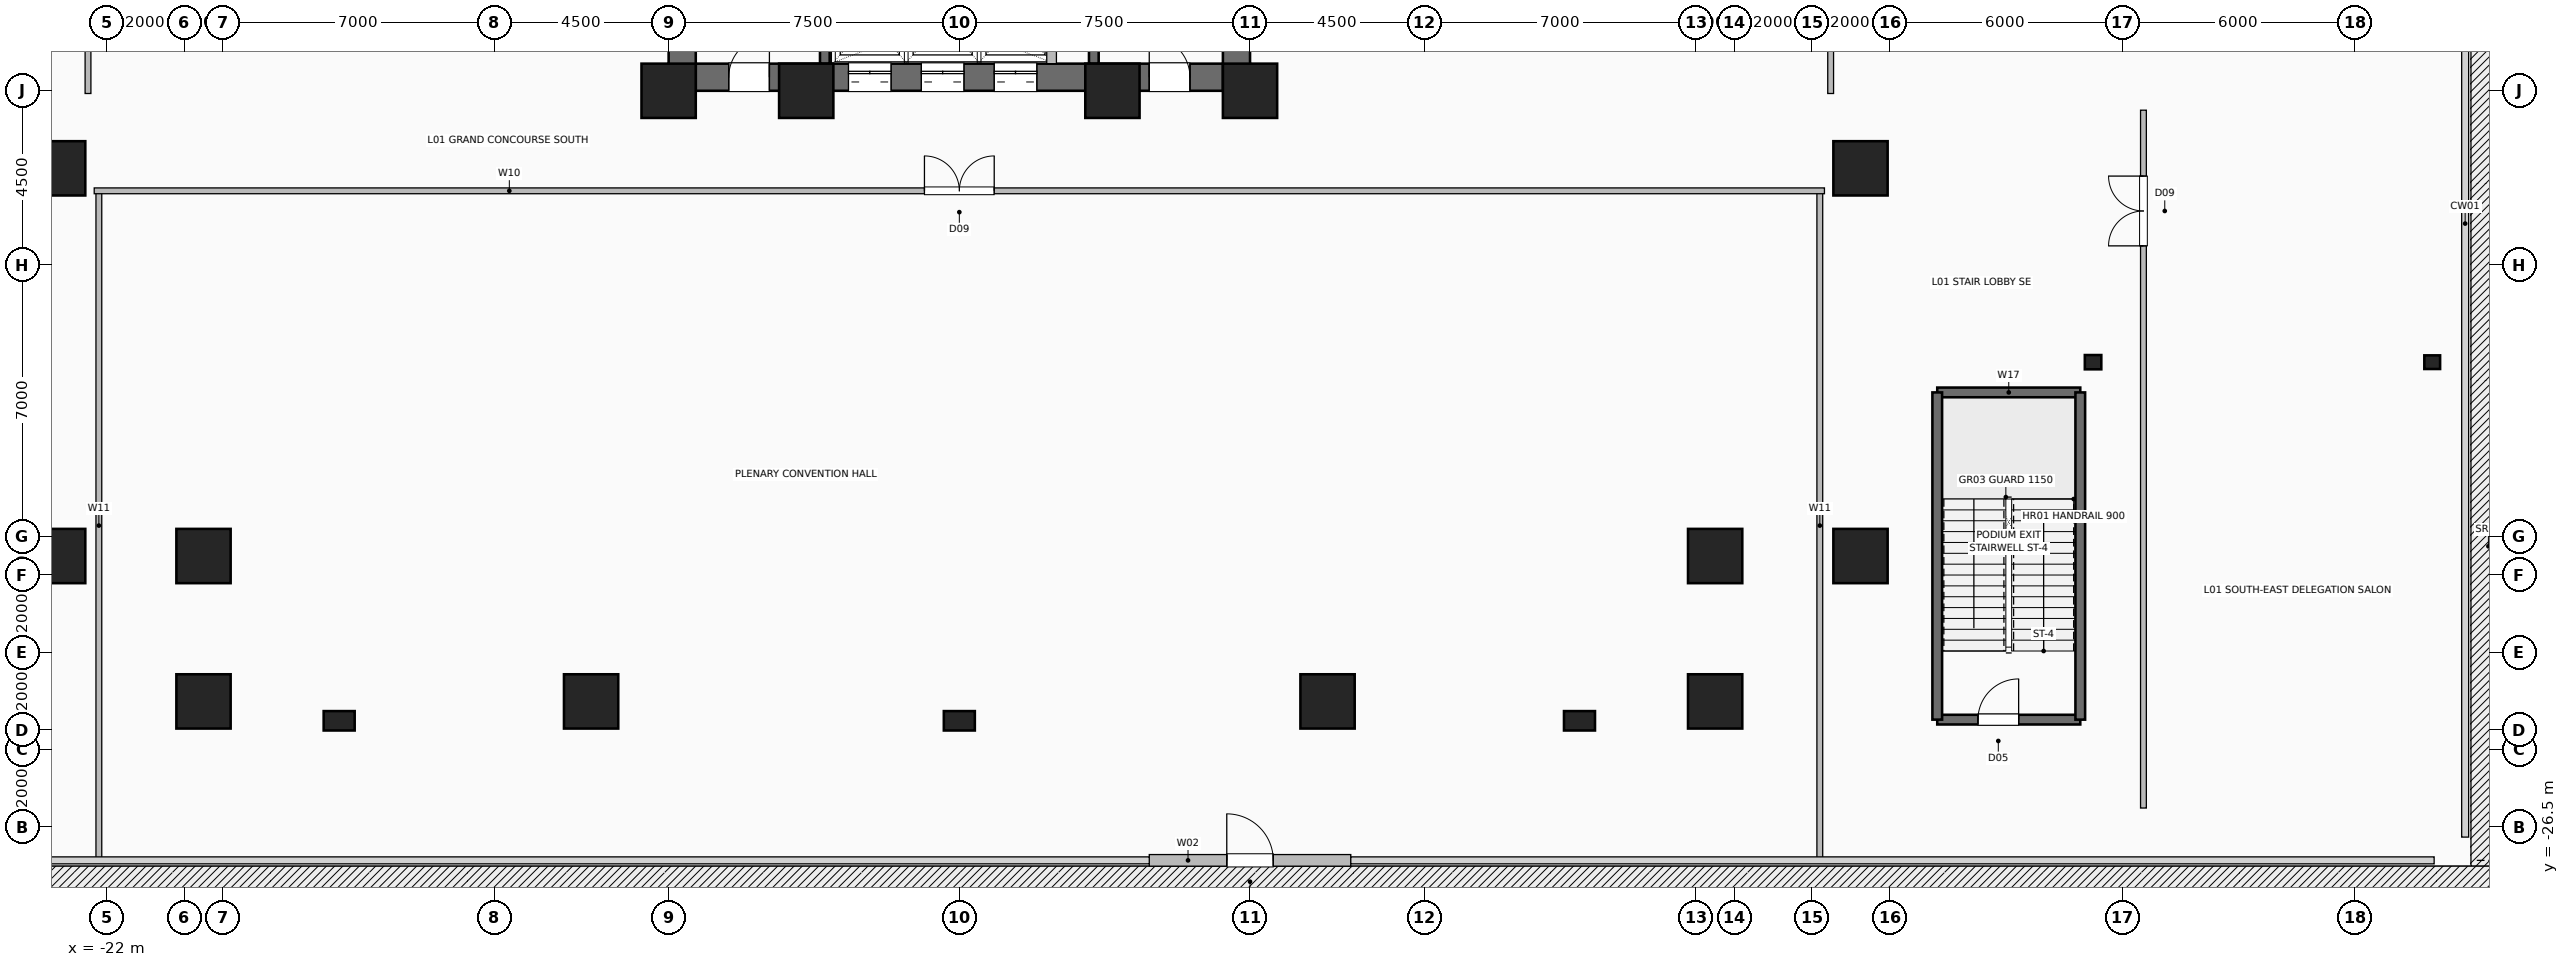
"""IFC4 building model, lengths in metres.
Left out: names, types, materials, properties, quantities, classifications, styles, units other than length and angle.
Written with IfcOpenShell. Run it as: python <this file> out.ifc"""

import sys

from ifc_helpers import new_model, si_unit, direction, frame, frame_2d, origin, origin_2d, place, context, subcontext, project, spatial, rectangle, hollow_rectangle, i_section, extrude, element, fill, save


model = new_model("IFC4")
c1 = context("Model", 3, precision=1e-05, world=origin(), true_north=direction((0.0, 1.0)))
c2 = subcontext(c1, "Body", "Model", "MODEL_VIEW")
j1 = project(units=[si_unit("LENGTHUNIT", "METRE"), si_unit("PLANEANGLEUNIT", "RADIAN")], contexts=[c1])
p1 = place(None, origin())
s1 = spatial("IfcSite", under=j1, at=p1, CompositionType="ELEMENT")
p2 = place(p1, origin())
s2 = spatial("IfcBuilding", under=s1, at=p2, CompositionType="ELEMENT")
p3 = place(p2, frame((0.0, 0.0, 5.4)))
s3 = spatial("IfcBuildingStorey", under=s2, at=p3, CompositionType="ELEMENT", Elevation=5.4)
for number, where, z_axis, x_axis in (
    (1, (-7.5, -7.5, 0.0), (0.0, 0.0, 1.0), (1.0, 0.0, 0.0)),
    (2, (-3.95, -7.5, 0.0), (0.0, 0.0, 1.0), (1.0, 0.0, 0.0)),
    (3, (3.95, -7.5, 0.0), (0.0, 0.0, 1.0), (1.0, 0.0, 0.0)),
    (4, (7.5, -7.5, 0.0), (0.0, 0.0, 1.0), (1.0, 0.0, 0.0)),
    (5, (-19.5, -23.25, 0.0), (0.0, 0.0, 1.0), (1.0, 0.0, 0.0)),
    (6, (-9.5, -23.25, 0.0), (0.0, 0.0, 1.0), (1.0, 0.0, 0.0)),
    (7, (9.5, -23.25, 0.0), (0.0, 0.0, 1.0), (1.0, 0.0, 0.0)),
    (8, (19.5, -23.25, 0.0), (0.0, 0.0, 1.0), (1.0, 0.0, 0.0)),
    (9, (-23.25, -19.5, 0.0), (0.0, 0.0, 1.0), (1.0, 0.0, 0.0)),
    (10, (-23.25, -9.5, 0.0), (0.0, 0.0, 1.0), (1.0, 0.0, 0.0)),
    (11, (23.25, -19.5, 0.0), (0.0, 0.0, 1.0), (1.0, 0.0, 0.0)),
    (12, (23.25, -9.5, 0.0), (0.0, 0.0, 1.0), (1.0, 0.0, 0.0)),
    (13, (-19.5, -19.5, 0.0), (0.0, 0.0, 1.0), (1.0, 0.0, 0.0)),
    (14, (19.5, -19.5, 0.0), (0.0, 0.0, 1.0), (1.0, 0.0, 0.0)),
):
    element("IfcColumn", number, at=place(p3, frame(where, z_axis=z_axis, x_axis=x_axis)), inside=s3, PredefinedType="COLUMN", context=c2, shape_type="SweptSolid", body=[
        extrude(hollow_rectangle(XDim=1.4, YDim=1.4, WallThickness=0.06, at=origin_2d()), origin(), (0.0, 0.0, 1.0), 5.4),
    ])
p4 = place(p3, frame((29.25, -14.5, 0.0), z_axis=(0.0, 0.0, 1.0), x_axis=(1.0, 0.0, 0.0)))
e15 = element("IfcColumn", 15, at=p4, inside=s3, PredefinedType="COLUMN", context=c2, shape_type="SweptSolid", body=[
    extrude(i_section(OverallWidth=0.368, OverallDepth=0.425, WebThickness=0.03, FlangeThickness=0.048, FilletRadius=0.02, at=origin_2d()), origin(), (0.0, 0.0, 1.0), 5.4),
])
p5 = place(p3, frame((38.0, -14.5, -0.4), z_axis=(0.0, 0.0, 1.0), x_axis=(1.0, 0.0, 0.0)))
e16 = element("IfcColumn", 16, at=p5, inside=s3, PredefinedType="COLUMN", context=c2, shape_type="SweptSolid", body=[
    extrude(i_section(OverallWidth=0.352, OverallDepth=0.407, WebThickness=0.025, FlangeThickness=0.04, FilletRadius=0.02, at=origin_2d()), origin(), (0.0, 0.0, 1.0), 5.4),
])
for number, where, z_axis, x_axis in (
    (17, (-16.0, -23.75, 0.0), (0.0, 0.0, 1.0), (1.0, 0.0, 0.0)),
    (18, (0.0, -23.75, 0.0), (0.0, 0.0, 1.0), (1.0, 0.0, 0.0)),
    (19, (16.0, -23.75, 0.0), (0.0, 0.0, 1.0), (1.0, 0.0, 0.0)),
):
    element("IfcColumn", number, at=place(p3, frame(where, z_axis=z_axis, x_axis=x_axis)), inside=s3, PredefinedType="PILASTER", context=c2, shape_type="SweptSolid", body=[
        extrude(rectangle(XDim=0.5, YDim=0.8, at=origin_2d()), origin(), (0.0, 0.0, 1.0), 5.4),
    ])
p6 = place(p3, frame((4.9, -27.35, 0.0), z_axis=(0.0, 0.0, 1.0), x_axis=(1.0, 0.0, 0.0)))
e20 = element("IfcWall", 20, at=p6, inside=s3, PredefinedType="SOLIDWALL", context=c2, shape_type="SweptSolid", body=[
    extrude(rectangle(XDim=5.2, YDim=0.3, at=frame_2d((2.6, 0.0))), origin(), (0.0, 0.0, 1.0), 5.0),
])
p7 = place(p6, frame((2.0, 0.0, 0.0)))
e21 = element("IfcOpeningElement", 21, at=p7, cuts=e20, PredefinedType="OPENING", context=c2, shape_type="SweptSolid", body=[
    extrude(rectangle(XDim=1.2, YDim=2.25, at=frame_2d((0.6, 1.125))), frame((0.0, 0.16, 0.0), z_axis=(0.0, -1.0, 0.0), x_axis=(1.0, 0.0, 0.0)), (0.0, 0.0, 1.0), 0.32),
])
p8 = place(p3, frame((-7.5, -7.15, 0.0), z_axis=(0.0, 0.0, 1.0), x_axis=(1.0, 0.0, 0.0)))
e22 = element("IfcWall", 22, at=p8, inside=s3, PredefinedType="SHEAR", context=c2, shape_type="SweptSolid", body=[
    extrude(rectangle(XDim=15.0, YDim=0.7, at=frame_2d((7.5, 0.0))), origin(), (0.0, 0.0, 1.0), 5.0),
])
p9 = place(p8, frame((1.55, 0.0, 0.0)))
e23 = element("IfcOpeningElement", 23, at=p9, cuts=e22, PredefinedType="OPENING", context=c2, shape_type="SweptSolid", body=[
    extrude(rectangle(XDim=1.05, YDim=2.08, at=frame_2d((0.525, 1.04))), frame((0.0, 0.36, 0.0), z_axis=(0.0, -1.0, 0.0), x_axis=(1.0, 0.0, 0.0)), (0.0, 0.0, 1.0), 0.72),
])
p10 = place(p8, frame((12.4, 0.0, 0.0)))
e24 = element("IfcOpeningElement", 24, at=p10, cuts=e22, PredefinedType="OPENING", context=c2, shape_type="SweptSolid", body=[
    extrude(rectangle(XDim=1.05, YDim=2.08, at=frame_2d((0.525, 1.04))), frame((0.0, 0.36, 0.0), z_axis=(0.0, -1.0, 0.0), x_axis=(1.0, 0.0, 0.0)), (0.0, 0.0, 1.0), 0.72),
])
p11 = place(p8, frame((4.64, 0.0, 0.0)))
e25 = element("IfcOpeningElement", 25, at=p11, cuts=e22, PredefinedType="OPENING", context=c2, shape_type="SweptSolid", body=[
    extrude(rectangle(XDim=1.1, YDim=2.2, at=frame_2d((0.55, 1.1))), frame((0.0, 0.36, 0.0), z_axis=(0.0, -1.0, 0.0), x_axis=(1.0, 0.0, 0.0)), (0.0, 0.0, 1.0), 0.72),
])
p12 = place(p8, frame((6.52, 0.0, 0.0)))
e26 = element("IfcOpeningElement", 26, at=p12, cuts=e22, PredefinedType="OPENING", context=c2, shape_type="SweptSolid", body=[
    extrude(rectangle(XDim=1.1, YDim=2.2, at=frame_2d((0.55, 1.1))), frame((0.0, 0.36, 0.0), z_axis=(0.0, -1.0, 0.0), x_axis=(1.0, 0.0, 0.0)), (0.0, 0.0, 1.0), 0.72),
])
p13 = place(p8, frame((8.4, 0.0, 0.0)))
e27 = element("IfcOpeningElement", 27, at=p13, cuts=e22, PredefinedType="OPENING", context=c2, shape_type="SweptSolid", body=[
    extrude(rectangle(XDim=1.1, YDim=2.2, at=frame_2d((0.55, 1.1))), frame((0.0, 0.36, 0.0), z_axis=(0.0, -1.0, 0.0), x_axis=(1.0, 0.0, 0.0)), (0.0, 0.0, 1.0), 0.72),
])
p14 = place(p3, frame((-7.15, -7.5, 0.0), z_axis=(0.0, 0.0, 1.0), x_axis=(0.0, 1.0, 0.0)))
e28 = element("IfcWall", 28, at=p14, inside=s3, PredefinedType="SHEAR", context=c2, shape_type="SweptSolid", body=[
    extrude(rectangle(XDim=15.0, YDim=0.7, at=frame_2d((7.5, 0.0))), origin(), (0.0, 0.0, 1.0), 5.0),
])
p15 = place(p14, frame((9.5, 0.0, 0.0)))
e29 = element("IfcOpeningElement", 29, at=p15, cuts=e28, PredefinedType="OPENING", context=c2, shape_type="SweptSolid", body=[
    extrude(rectangle(XDim=1.0, YDim=2.08, at=frame_2d((0.5, 1.04))), frame((0.0, 0.36, 0.0), z_axis=(0.0, -1.0, 0.0), x_axis=(1.0, 0.0, 0.0)), (0.0, 0.0, 1.0), 0.72),
])
p16 = place(p3, frame((7.15, -7.5, 0.0), z_axis=(0.0, 0.0, 1.0), x_axis=(0.0, 1.0, 0.0)))
e30 = element("IfcWall", 30, at=p16, inside=s3, PredefinedType="SHEAR", context=c2, shape_type="SweptSolid", body=[
    extrude(rectangle(XDim=15.0, YDim=0.7, at=frame_2d((7.5, 0.0))), origin(), (0.0, 0.0, 1.0), 5.0),
])
p17 = place(p16, frame((12.6, 0.0, 0.0)))
e31 = element("IfcOpeningElement", 31, at=p17, cuts=e30, PredefinedType="OPENING", context=c2, shape_type="SweptSolid", body=[
    extrude(rectangle(XDim=1.2, YDim=2.2, at=frame_2d((0.6, 1.1))), frame((0.0, 0.36, 0.0), z_axis=(0.0, -1.0, 0.0), x_axis=(1.0, 0.0, 0.0)), (0.0, 0.0, 1.0), 0.72),
])
for number, where, z_axis, x_axis in (
    (32, (-3.47, -6.8, 0.0), (0.0, 0.0, 1.0), (0.0, 1.0, 0.0)),
    (33, (3.47, -6.8, 0.0), (0.0, 0.0, 1.0), (0.0, 1.0, 0.0)),
):
    element("IfcWall", number, at=place(p3, frame(where, z_axis=z_axis, x_axis=x_axis)), inside=s3, PredefinedType="SHEAR", context=c2, shape_type="SweptSolid", body=[
        extrude(rectangle(XDim=7.72, YDim=0.25, at=frame_2d((3.86, 0.0))), origin(), (0.0, 0.0, 1.0), 5.0),
    ])
p18 = place(p3, frame((2.38, -6.8, 0.0), z_axis=(0.0, 0.0, 1.0), x_axis=(0.0, 1.0, 0.0)))
e34 = element("IfcWall", 34, at=p18, inside=s3, PredefinedType="SHEAR", context=c2, shape_type="SweptSolid", body=[
    extrude(rectangle(XDim=2.22, YDim=0.25, at=frame_2d((1.11, 0.0))), origin(), (0.0, 0.0, 1.0), 5.0),
])
p19 = place(p3, frame((25.23, -23.72, 0.0), z_axis=(0.0, 0.0, 1.0), x_axis=(1.0, 0.0, 0.0)))
e35 = element("IfcWall", 35, at=p19, inside=s3, PredefinedType="SHEAR", context=c2, shape_type="SweptSolid", body=[
    extrude(rectangle(XDim=3.69, YDim=0.25, at=frame_2d((1.845, 0.0))), origin(), (0.0, 0.0, 1.0), 5.0),
])
p20 = place(p19, frame((1.05, 0.0, 0.0)))
e36 = element("IfcOpeningElement", 36, at=p20, cuts=e35, PredefinedType="OPENING", context=c2, shape_type="SweptSolid", body=[
    extrude(rectangle(XDim=1.05, YDim=2.08, at=frame_2d((0.525, 1.04))), frame((0.0, 0.135, 0.0), z_axis=(0.0, -1.0, 0.0), x_axis=(1.0, 0.0, 0.0)), (0.0, 0.0, 1.0), 0.27),
])
p21 = place(p3, frame((25.23, -15.28, 0.0), z_axis=(0.0, 0.0, 1.0), x_axis=(1.0, 0.0, 0.0)))
e37 = element("IfcWall", 37, at=p21, inside=s3, PredefinedType="SHEAR", context=c2, shape_type="SweptSolid", body=[
    extrude(rectangle(XDim=3.69, YDim=0.25, at=frame_2d((1.845, 0.0))), origin(), (0.0, 0.0, 1.0), 5.0),
])
for number, where, z_axis, x_axis in (
    (38, (25.23, -23.72, 0.0), (0.0, 0.0, 1.0), (0.0, 1.0, 0.0)),
    (39, (28.92, -23.72, 0.0), (0.0, 0.0, 1.0), (0.0, 1.0, 0.0)),
):
    element("IfcWall", number, at=place(p3, frame(where, z_axis=z_axis, x_axis=x_axis)), inside=s3, PredefinedType="SHEAR", context=c2, shape_type="SweptSolid", body=[
        extrude(rectangle(XDim=8.44, YDim=0.25, at=frame_2d((4.22, 0.0))), origin(), (0.0, 0.0, 1.0), 5.0),
    ])
for number, where, z_axis, x_axis in (
    (40, (-22.2, -27.35, 0.0), (0.0, 0.0, 1.0), (0.0, 1.0, 0.0)),
    (41, (22.2, -27.35, 0.0), (0.0, 0.0, 1.0), (0.0, 1.0, 0.0)),
):
    element("IfcWall", number, at=place(p3, frame(where, z_axis=z_axis, x_axis=x_axis)), inside=s3, PredefinedType="PARTITIONING", context=c2, shape_type="SweptSolid", body=[
        extrude(rectangle(XDim=17.27, YDim=0.15, at=frame_2d((8.635, 0.0))), origin(), (0.0, 0.0, 1.0), 5.0),
    ])
p22 = place(p3, frame((-22.32, -10.08, 0.0), z_axis=(0.0, 0.0, 1.0), x_axis=(1.0, 0.0, 0.0)))
e42 = element("IfcWall", 42, at=p22, inside=s3, PredefinedType="PARTITIONING", context=c2, shape_type="SweptSolid", body=[
    extrude(rectangle(XDim=44.64, YDim=0.15, at=frame_2d((22.32, 0.0))), origin(), (0.0, 0.0, 1.0), 5.0),
])
p23 = place(p22, frame((21.42, 0.0, 0.0)))
e43 = element("IfcOpeningElement", 43, at=p23, cuts=e42, PredefinedType="OPENING", context=c2, shape_type="SweptSolid", body=[
    extrude(rectangle(XDim=1.8, YDim=2.08, at=frame_2d((0.9, 1.04))), frame((0.0, 0.085, 0.0), z_axis=(0.0, -1.0, 0.0), x_axis=(1.0, 0.0, 0.0)), (0.0, 0.0, 1.0), 0.17),
])
p24 = place(p3, frame((-22.48, -7.57, 0.0), z_axis=(0.0, 0.0, 1.0), x_axis=(0.0, 1.0, 0.0)))
e44 = element("IfcWall", 44, at=p24, inside=s3, PredefinedType="PARTITIONING", context=c2, shape_type="SweptSolid", body=[
    extrude(rectangle(XDim=12.29, YDim=0.15, at=frame_2d((6.145, 0.0))), origin(), (0.0, 0.0, 1.0), 5.0),
])
p25 = place(p24, frame((1.73, 0.0, 0.0)))
e45 = element("IfcOpeningElement", 45, at=p25, cuts=e44, PredefinedType="OPENING", context=c2, shape_type="SweptSolid", body=[
    extrude(rectangle(XDim=0.95, YDim=2.06, at=frame_2d((0.475, 1.03))), frame((0.0, 0.085, 0.0), z_axis=(0.0, -1.0, 0.0), x_axis=(1.0, 0.0, 0.0)), (0.0, 0.0, 1.0), 0.17),
])
p26 = place(p24, frame((7.795, 0.0, 0.0)))
e46 = element("IfcOpeningElement", 46, at=p26, cuts=e44, PredefinedType="OPENING", context=c2, shape_type="SweptSolid", body=[
    extrude(rectangle(XDim=0.95, YDim=2.06, at=frame_2d((0.475, 1.03))), frame((0.0, 0.085, 0.0), z_axis=(0.0, -1.0, 0.0), x_axis=(1.0, 0.0, 0.0)), (0.0, 0.0, 1.0), 0.17),
])
p27 = place(p3, frame((22.48, -7.57, 0.0), z_axis=(0.0, 0.0, 1.0), x_axis=(0.0, 1.0, 0.0)))
e47 = element("IfcWall", 47, at=p27, inside=s3, PredefinedType="PARTITIONING", context=c2, shape_type="SweptSolid", body=[
    extrude(rectangle(XDim=9.24, YDim=0.15, at=frame_2d((4.62, 0.0))), origin(), (0.0, 0.0, 1.0), 5.0),
])
p28 = place(p27, frame((1.58, 0.0, 0.0)))
e48 = element("IfcOpeningElement", 48, at=p28, cuts=e47, PredefinedType="OPENING", context=c2, shape_type="SweptSolid", body=[
    extrude(rectangle(XDim=0.95, YDim=2.06, at=frame_2d((0.475, 1.03))), frame((0.0, 0.085, 0.0), z_axis=(0.0, -1.0, 0.0), x_axis=(1.0, 0.0, 0.0)), (0.0, 0.0, 1.0), 0.17),
])
p29 = place(p27, frame((4.73, 0.0, 0.0)))
e49 = element("IfcOpeningElement", 49, at=p29, cuts=e47, PredefinedType="OPENING", context=c2, shape_type="SweptSolid", body=[
    extrude(rectangle(XDim=0.85, YDim=2.05, at=frame_2d((0.425, 1.025))), frame((0.0, 0.085, 0.0), z_axis=(0.0, -1.0, 0.0), x_axis=(1.0, 0.0, 0.0)), (0.0, 0.0, 1.0), 0.17),
])
p30 = place(p27, frame((7.205, 0.0, 0.0)))
e50 = element("IfcOpeningElement", 50, at=p30, cuts=e47, PredefinedType="OPENING", context=c2, shape_type="SweptSolid", body=[
    extrude(rectangle(XDim=0.95, YDim=2.06, at=frame_2d((0.475, 1.03))), frame((0.0, 0.085, 0.0), z_axis=(0.0, -1.0, 0.0), x_axis=(1.0, 0.0, 0.0)), (0.0, 0.0, 1.0), 0.17),
])
p31 = place(p3, frame((30.55, -26.0, 0.0), z_axis=(0.0, 0.0, 1.0), x_axis=(0.0, 1.0, 0.0)))
e51 = element("IfcWall", 51, at=p31, inside=s3, PredefinedType="PARTITIONING", context=c2, shape_type="SweptSolid", body=[
    extrude(rectangle(XDim=18.0, YDim=0.15, at=frame_2d((9.0, 0.0))), origin(), (0.0, 0.0, 1.0), 5.0),
])
p32 = place(p31, frame((14.5, 0.0, 0.0)))
e52 = element("IfcOpeningElement", 52, at=p32, cuts=e51, PredefinedType="OPENING", context=c2, shape_type="SweptSolid", body=[
    extrude(rectangle(XDim=1.8, YDim=2.08, at=frame_2d((0.9, 1.04))), frame((0.0, 0.085, 0.0), z_axis=(0.0, -1.0, 0.0), x_axis=(1.0, 0.0, 0.0)), (0.0, 0.0, 1.0), 0.17),
])
p33 = place(p7, origin())
e53 = element("IfcDoor", 53, at=p33, inside=s3, OperationType="SINGLE_SWING_LEFT", PredefinedType="DOOR", context=c2, shape_type="SweptSolid", body=[
    extrude(rectangle(XDim=1.2, YDim=2.25, at=frame_2d((0.6, 1.125))), frame((0.0, 0.025, 0.0), z_axis=(0.0, -1.0, 0.0), x_axis=(1.0, 0.0, 0.0)), (0.0, 0.0, 1.0), 0.05),
])
fill(e21, e53)
p34 = place(p9, origin())
e54 = element("IfcDoor", 54, at=p34, inside=s3, OperationType="SINGLE_SWING_RIGHT", PredefinedType="DOOR", context=c2, shape_type="SweptSolid", body=[
    extrude(rectangle(XDim=1.05, YDim=2.08, at=frame_2d((0.525, 1.04))), frame((0.0, 0.025, 0.0), z_axis=(0.0, -1.0, 0.0), x_axis=(1.0, 0.0, 0.0)), (0.0, 0.0, 1.0), 0.05),
])
fill(e23, e54)
p35 = place(p10, origin())
e55 = element("IfcDoor", 55, at=p35, inside=s3, OperationType="SINGLE_SWING_LEFT", PredefinedType="DOOR", context=c2, shape_type="SweptSolid", body=[
    extrude(rectangle(XDim=1.05, YDim=2.08, at=frame_2d((0.525, 1.04))), frame((0.0, 0.025, 0.0), z_axis=(0.0, -1.0, 0.0), x_axis=(1.0, 0.0, 0.0)), (0.0, 0.0, 1.0), 0.05),
])
fill(e24, e55)
p36 = place(p11, origin())
e56 = element("IfcDoor", 56, at=p36, inside=s3, OperationType="DOUBLE_DOOR_SLIDING", PredefinedType="DOOR", context=c2, shape_type="SweptSolid", body=[
    extrude(rectangle(XDim=1.1, YDim=2.2, at=frame_2d((0.55, 1.1))), frame((0.0, 0.025, 0.0), z_axis=(0.0, -1.0, 0.0), x_axis=(1.0, 0.0, 0.0)), (0.0, 0.0, 1.0), 0.05),
])
fill(e25, e56)
p37 = place(p12, origin())
e57 = element("IfcDoor", 57, at=p37, inside=s3, OperationType="DOUBLE_DOOR_SLIDING", PredefinedType="DOOR", context=c2, shape_type="SweptSolid", body=[
    extrude(rectangle(XDim=1.1, YDim=2.2, at=frame_2d((0.55, 1.1))), frame((0.0, 0.025, 0.0), z_axis=(0.0, -1.0, 0.0), x_axis=(1.0, 0.0, 0.0)), (0.0, 0.0, 1.0), 0.05),
])
fill(e26, e57)
p38 = place(p13, origin())
e58 = element("IfcDoor", 58, at=p38, inside=s3, OperationType="DOUBLE_DOOR_SLIDING", PredefinedType="DOOR", context=c2, shape_type="SweptSolid", body=[
    extrude(rectangle(XDim=1.1, YDim=2.2, at=frame_2d((0.55, 1.1))), frame((0.0, 0.025, 0.0), z_axis=(0.0, -1.0, 0.0), x_axis=(1.0, 0.0, 0.0)), (0.0, 0.0, 1.0), 0.05),
])
fill(e27, e58)
p39 = place(p20, origin())
e59 = element("IfcDoor", 59, at=p39, inside=s3, OperationType="SINGLE_SWING_RIGHT", PredefinedType="DOOR", context=c2, shape_type="SweptSolid", body=[
    extrude(rectangle(XDim=1.05, YDim=2.08, at=frame_2d((0.525, 1.04))), frame((0.0, 0.025, 0.0), z_axis=(0.0, -1.0, 0.0), x_axis=(1.0, 0.0, 0.0)), (0.0, 0.0, 1.0), 0.05),
])
fill(e36, e59)
p40 = place(p23, origin())
e60 = element("IfcDoor", 60, at=p40, inside=s3, OperationType="DOUBLE_DOOR_SINGLE_SWING", PredefinedType="DOOR", context=c2, shape_type="SweptSolid", body=[
    extrude(rectangle(XDim=1.8, YDim=2.08, at=frame_2d((0.9, 1.04))), frame((0.0, 0.025, 0.0), z_axis=(0.0, -1.0, 0.0), x_axis=(1.0, 0.0, 0.0)), (0.0, 0.0, 1.0), 0.05),
])
fill(e43, e60)
p41 = place(p32, origin())
e61 = element("IfcDoor", 61, at=p41, inside=s3, OperationType="DOUBLE_DOOR_SINGLE_SWING", PredefinedType="DOOR", context=c2, shape_type="SweptSolid", body=[
    extrude(rectangle(XDim=1.8, YDim=2.08, at=frame_2d((0.9, 1.04))), frame((0.0, 0.025, 0.0), z_axis=(0.0, -1.0, 0.0), x_axis=(1.0, 0.0, 0.0)), (0.0, 0.0, 1.0), 0.05),
])
fill(e52, e61)
save(model, sys.argv[1])
